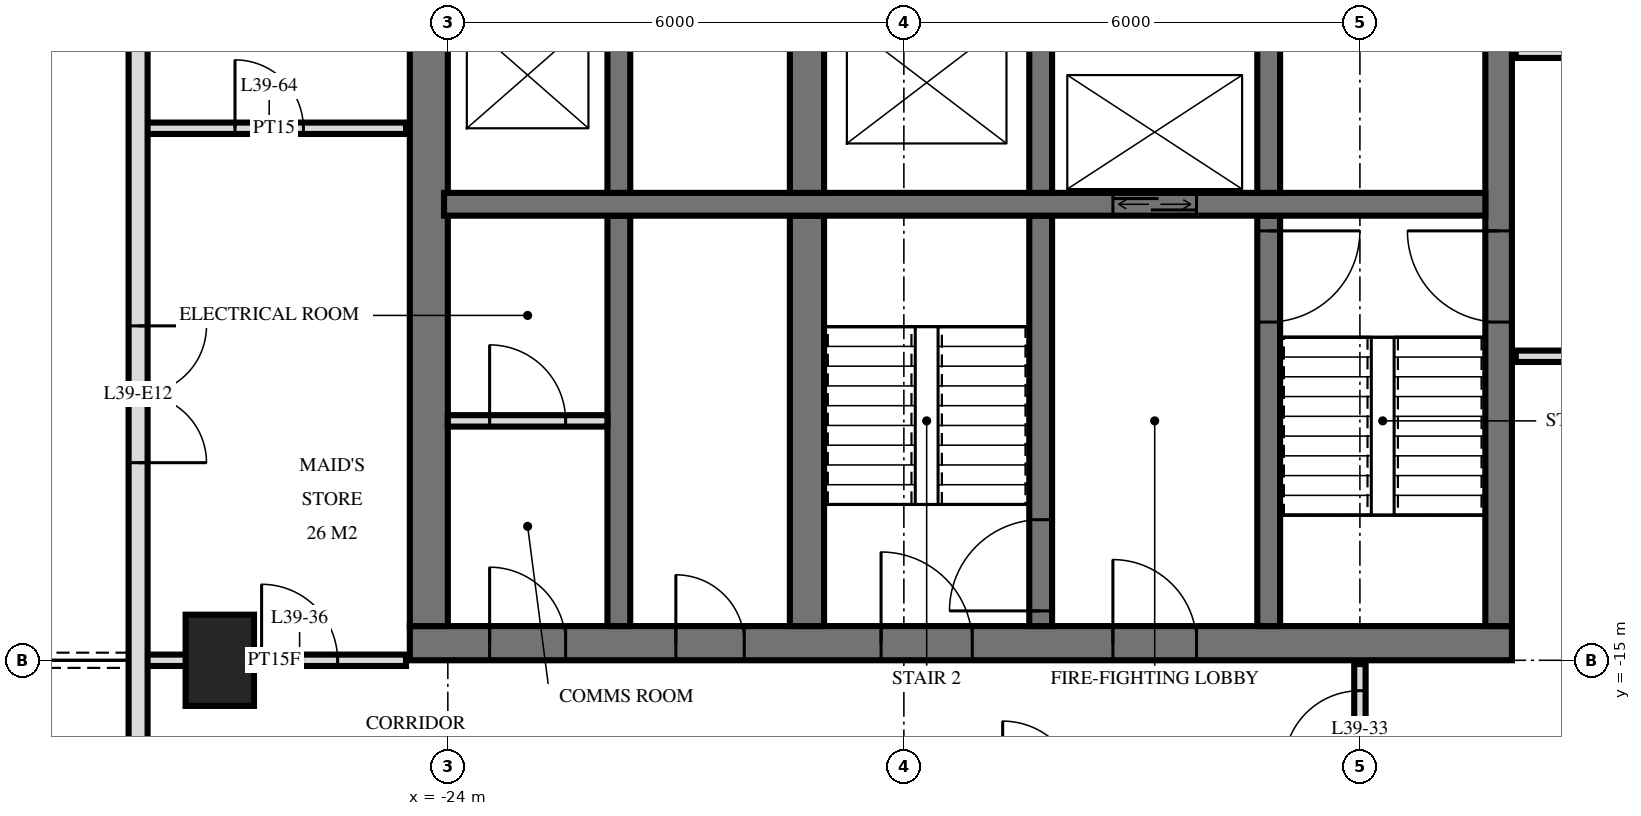
"""IFC4 building model, lengths in metres.
Left out: names, types, materials, properties, quantities, classifications, styles, units other than length and angle.
Written with IfcOpenShell. Run it as: python <this file> out.ifc"""

import sys

from ifc_helpers import new_model, si_unit, direction, frame, frame_2d, origin, origin_2d, place, context, subcontext, project, spatial, rectangle, extrude, element, fill, save


model = new_model("IFC4")
c1 = context("Model", 3, precision=1e-05, world=origin(), true_north=direction((0.0, 1.0)))
c2 = subcontext(c1, "Body", "Model", "MODEL_VIEW")
j1 = project(units=[si_unit("LENGTHUNIT", "METRE"), si_unit("PLANEANGLEUNIT", "RADIAN")], contexts=[c1])
p1 = place(None, origin())
s1 = spatial("IfcSite", under=j1, at=p1, CompositionType="ELEMENT")
p2 = place(p1, origin())
s2 = spatial("IfcBuilding", under=s1, at=p2, CompositionType="ELEMENT")
p3 = place(p2, frame((0.0, 0.0, 152.4)))
s3 = spatial("IfcBuildingStorey", under=s2, at=p3, CompositionType="ELEMENT", Elevation=152.4)
p4 = place(p3, frame((-27.0, -15.0, 0.0), z_axis=(0.0, 0.0, 1.0), x_axis=(0.0, 1.0, 0.0)))
e1 = element("IfcColumn", 1, at=p4, inside=s3, PredefinedType="COLUMN", context=c2, shape_type="SweptSolid", body=[
    extrude(rectangle(XDim=1.2, YDim=0.9, at=origin_2d()), origin(), (0.0, 0.0, 1.0), 3.6),
])
p5 = place(p3, frame((-24.5, -14.775, 0.0), z_axis=(0.0, 0.0, 1.0), x_axis=(1.0, 0.0, 0.0)))
e2 = element("IfcWall", 2, at=p5, inside=s3, PredefinedType="SHEAR", context=c2, shape_type="SweptSolid", body=[
    extrude(rectangle(XDim=14.5, YDim=0.45, at=frame_2d((7.25, 0.0))), origin(), (0.0, 0.0, 1.0), 3.6),
])
p6 = place(p5, frame((6.2, 0.0, 0.0)))
e3 = element("IfcOpeningElement", 3, at=p6, cuts=e2, PredefinedType="OPENING", context=c2, shape_type="SweptSolid", body=[
    extrude(rectangle(XDim=1.2, YDim=2.1, at=frame_2d((0.6, 1.05))), frame((0.0, 0.235, 0.0), z_axis=(0.0, -1.0, 0.0), x_axis=(1.0, 0.0, 0.0)), (0.0, 0.0, 1.0), 0.47),
])
p7 = place(p5, frame((9.25, 0.0, 0.0)))
e4 = element("IfcOpeningElement", 4, at=p7, cuts=e2, PredefinedType="OPENING", context=c2, shape_type="SweptSolid", body=[
    extrude(rectangle(XDim=1.1, YDim=2.1, at=frame_2d((0.55, 1.05))), frame((0.0, 0.235, 0.0), z_axis=(0.0, -1.0, 0.0), x_axis=(1.0, 0.0, 0.0)), (0.0, 0.0, 1.0), 0.47),
])
p8 = place(p5, frame((3.5, 0.0, 0.0)))
e5 = element("IfcOpeningElement", 5, at=p8, cuts=e2, PredefinedType="OPENING", context=c2, shape_type="SweptSolid", body=[
    extrude(rectangle(XDim=0.9, YDim=2.1, at=frame_2d((0.45, 1.05))), frame((0.0, 0.235, 0.0), z_axis=(0.0, -1.0, 0.0), x_axis=(1.0, 0.0, 0.0)), (0.0, 0.0, 1.0), 0.47),
])
p9 = place(p5, frame((1.05, 0.0, 0.0)))
e6 = element("IfcOpeningElement", 6, at=p9, cuts=e2, PredefinedType="OPENING", context=c2, shape_type="SweptSolid", body=[
    extrude(rectangle(XDim=1.0, YDim=2.1, at=frame_2d((0.5, 1.05))), frame((0.0, 0.235, 0.0), z_axis=(0.0, -1.0, 0.0), x_axis=(1.0, 0.0, 0.0)), (0.0, 0.0, 1.0), 0.47),
])
p10 = place(p3, frame((-10.175, -14.55, 0.0), z_axis=(0.0, 0.0, 1.0), x_axis=(0.0, 1.0, 0.0)))
e7 = element("IfcWall", 7, at=p10, inside=s3, PredefinedType="SHEAR", context=c2, shape_type="SweptSolid", body=[
    extrude(rectangle(XDim=14.1, YDim=0.35, at=frame_2d((7.05, 0.0))), origin(), (0.0, 0.0, 1.0), 3.6),
])
p11 = place(p10, frame((8.4, 0.0, 0.0)))
e8 = element("IfcOpeningElement", 8, at=p11, cuts=e7, PredefinedType="OPENING", context=c2, shape_type="SweptSolid", body=[
    extrude(rectangle(XDim=1.4, YDim=2.4, at=frame_2d((0.7, 1.2))), frame((0.0, 0.185, 0.0), z_axis=(0.0, -1.0, 0.0), x_axis=(1.0, 0.0, 0.0)), (0.0, 0.0, 1.0), 0.37),
])
p12 = place(p10, frame((10.0, 0.0, 0.0)))
e9 = element("IfcOpeningElement", 9, at=p12, cuts=e7, PredefinedType="OPENING", context=c2, shape_type="SweptSolid", body=[
    extrude(rectangle(XDim=1.4, YDim=2.4, at=frame_2d((0.7, 1.2))), frame((0.0, 0.185, 0.0), z_axis=(0.0, -1.0, 0.0), x_axis=(1.0, 0.0, 0.0)), (0.0, 0.0, 1.0), 0.37),
])
p13 = place(p10, frame((4.0, 0.0, 0.0)))
e10 = element("IfcOpeningElement", 10, at=p13, cuts=e7, PredefinedType="OPENING", context=c2, shape_type="SweptSolid", body=[
    extrude(rectangle(XDim=1.2, YDim=2.1, at=frame_2d((0.6, 1.05))), frame((0.0, 0.185, 0.0), z_axis=(0.0, -1.0, 0.0), x_axis=(1.0, 0.0, 0.0)), (0.0, 0.0, 1.0), 0.37),
])
p14 = place(p3, frame((-24.25, -14.55, 0.0), z_axis=(0.0, 0.0, 1.0), x_axis=(0.0, 1.0, 0.0)))
e11 = element("IfcWall", 11, at=p14, inside=s3, PredefinedType="SHEAR", context=c2, shape_type="SweptSolid", body=[
    extrude(rectangle(XDim=14.1, YDim=0.5, at=frame_2d((7.05, 0.0))), origin(), (0.0, 0.0, 1.0), 3.6),
])
p15 = place(p3, frame((-24.05, -9.0, 0.0), z_axis=(0.0, 0.0, 1.0), x_axis=(1.0, 0.0, 0.0)))
e12 = element("IfcWall", 12, at=p15, inside=s3, PredefinedType="SHEAR", context=c2, shape_type="SweptSolid", body=[
    extrude(rectangle(XDim=13.7, YDim=0.3, at=frame_2d((6.85, 0.0))), origin(), (0.0, 0.0, 1.0), 3.6),
])
p16 = place(p15, frame((8.8, 0.0, 0.0)))
e13 = element("IfcOpeningElement", 13, at=p16, cuts=e12, PredefinedType="OPENING", context=c2, shape_type="SweptSolid", body=[
    extrude(rectangle(XDim=1.1, YDim=2.1, at=frame_2d((0.55, 1.05))), frame((0.0, 0.16, 0.0), z_axis=(0.0, -1.0, 0.0), x_axis=(1.0, 0.0, 0.0)), (0.0, 0.0, 1.0), 0.32),
])
p17 = place(p3, frame((-13.2, -8.85, 0.0), z_axis=(0.0, 0.0, 1.0), x_axis=(0.0, 1.0, 0.0)))
e14 = element("IfcWall", 14, at=p17, inside=s3, PredefinedType="SHEAR", context=c2, shape_type="SweptSolid", body=[
    extrude(rectangle(XDim=2.3, YDim=0.3, at=frame_2d((1.15, 0.0))), origin(), (0.0, 0.0, 1.0), 3.6),
])
p18 = place(p3, frame((-13.2, -14.55, 0.0), z_axis=(0.0, 0.0, 1.0), x_axis=(0.0, 1.0, 0.0)))
e15 = element("IfcWall", 15, at=p18, inside=s3, PredefinedType="SHEAR", context=c2, shape_type="SweptSolid", body=[
    extrude(rectangle(XDim=5.4, YDim=0.3, at=frame_2d((2.7, 0.0))), origin(), (0.0, 0.0, 1.0), 3.6),
])
p19 = place(p18, frame((4.0, 0.0, 0.0)))
e16 = element("IfcOpeningElement", 16, at=p19, cuts=e15, PredefinedType="OPENING", context=c2, shape_type="SweptSolid", body=[
    extrude(rectangle(XDim=1.2, YDim=2.1, at=frame_2d((0.6, 1.05))), frame((0.0, 0.16, 0.0), z_axis=(0.0, -1.0, 0.0), x_axis=(1.0, 0.0, 0.0)), (0.0, 0.0, 1.0), 0.32),
])
p20 = place(p3, frame((-16.2, -8.85, 0.0), z_axis=(0.0, 0.0, 1.0), x_axis=(0.0, 1.0, 0.0)))
e17 = element("IfcWall", 17, at=p20, inside=s3, PredefinedType="SHEAR", context=c2, shape_type="SweptSolid", body=[
    extrude(rectangle(XDim=2.3, YDim=0.3, at=frame_2d((1.15, 0.0))), origin(), (0.0, 0.0, 1.0), 3.6),
])
p21 = place(p3, frame((-16.2, -14.55, 0.0), z_axis=(0.0, 0.0, 1.0), x_axis=(0.0, 1.0, 0.0)))
e18 = element("IfcWall", 18, at=p21, inside=s3, PredefinedType="SHEAR", context=c2, shape_type="SweptSolid", body=[
    extrude(rectangle(XDim=5.4, YDim=0.3, at=frame_2d((2.7, 0.0))), origin(), (0.0, 0.0, 1.0), 3.6),
])
p22 = place(p21, frame((0.2, 0.0, 0.0)))
e19 = element("IfcOpeningElement", 19, at=p22, cuts=e18, PredefinedType="OPENING", context=c2, shape_type="SweptSolid", body=[
    extrude(rectangle(XDim=1.2, YDim=2.1, at=frame_2d((0.6, 1.05))), frame((0.0, 0.16, 0.0), z_axis=(0.0, -1.0, 0.0), x_axis=(1.0, 0.0, 0.0)), (0.0, 0.0, 1.0), 0.32),
])
p23 = place(p3, frame((-19.275, -8.85, 0.0), z_axis=(0.0, 0.0, 1.0), x_axis=(0.0, 1.0, 0.0)))
e20 = element("IfcWall", 20, at=p23, inside=s3, PredefinedType="SHEAR", context=c2, shape_type="SweptSolid", body=[
    extrude(rectangle(XDim=2.3, YDim=0.45, at=frame_2d((1.15, 0.0))), origin(), (0.0, 0.0, 1.0), 3.6),
])
p24 = place(p3, frame((-19.275, -14.55, 0.0), z_axis=(0.0, 0.0, 1.0), x_axis=(0.0, 1.0, 0.0)))
e21 = element("IfcWall", 21, at=p24, inside=s3, PredefinedType="SHEAR", context=c2, shape_type="SweptSolid", body=[
    extrude(rectangle(XDim=5.4, YDim=0.45, at=frame_2d((2.7, 0.0))), origin(), (0.0, 0.0, 1.0), 3.6),
])
p25 = place(p3, frame((-21.75, -8.85, 0.0), z_axis=(0.0, 0.0, 1.0), x_axis=(0.0, 1.0, 0.0)))
e22 = element("IfcWall", 22, at=p25, inside=s3, PredefinedType="SHEAR", context=c2, shape_type="SweptSolid", body=[
    extrude(rectangle(XDim=2.3, YDim=0.3, at=frame_2d((1.15, 0.0))), origin(), (0.0, 0.0, 1.0), 3.6),
])
p26 = place(p3, frame((-21.75, -14.55, 0.0), z_axis=(0.0, 0.0, 1.0), x_axis=(0.0, 1.0, 0.0)))
e23 = element("IfcWall", 23, at=p26, inside=s3, PredefinedType="SHEAR", context=c2, shape_type="SweptSolid", body=[
    extrude(rectangle(XDim=5.4, YDim=0.3, at=frame_2d((2.7, 0.0))), origin(), (0.0, 0.0, 1.0), 3.6),
])
p27 = place(p3, frame((-28.075, -3.325, 0.0), z_axis=(0.0, 0.0, 1.0), x_axis=(0.0, -1.0, 0.0)))
e24 = element("IfcWall", 24, at=p27, inside=s3, PredefinedType="SOLIDWALL", context=c2, shape_type="SweptSolid", body=[
    extrude(rectangle(XDim=25.951, YDim=0.25, at=frame_2d((12.975, 0.0))), origin(), (0.0, 0.0, 1.0), 3.32),
])
p28 = place(p27, frame((7.275, 0.0, 0.0)))
e25 = element("IfcOpeningElement", 25, at=p28, cuts=e24, PredefinedType="OPENING", context=c2, shape_type="SweptSolid", body=[
    extrude(rectangle(XDim=1.8, YDim=2.4, at=frame_2d((0.9, 1.2))), frame((0.0, 0.135, 0.0), z_axis=(0.0, -1.0, 0.0), x_axis=(1.0, 0.0, 0.0)), (0.0, 0.0, 1.0), 0.27),
])
p29 = place(p27, frame((18.175, 0.0, 0.0)))
e26 = element("IfcOpeningElement", 26, at=p29, cuts=e24, PredefinedType="OPENING", context=c2, shape_type="SweptSolid", body=[
    extrude(rectangle(XDim=1.8, YDim=2.4, at=frame_2d((0.9, 1.2))), frame((0.0, 0.135, 0.0), z_axis=(0.0, -1.0, 0.0), x_axis=(1.0, 0.0, 0.0)), (0.0, 0.0, 1.0), 0.27),
])
p30 = place(p27, frame((21.075, 0.0, 0.0)))
e27 = element("IfcOpeningElement", 27, at=p30, cuts=e24, PredefinedType="OPENING", context=c2, shape_type="SweptSolid", body=[
    extrude(rectangle(XDim=1.8, YDim=2.4, at=frame_2d((0.9, 1.2))), frame((0.0, 0.135, 0.0), z_axis=(0.0, -1.0, 0.0), x_axis=(1.0, 0.0, 0.0)), (0.0, 0.0, 1.0), 0.27),
])
p31 = place(p27, frame((23.825, 0.0, 0.3)))
e28 = element("IfcOpeningElement", 28, at=p31, cuts=e24, PredefinedType="OPENING", context=c2, shape_type="SweptSolid", body=[
    extrude(rectangle(XDim=1.8, YDim=2.1, at=frame_2d((0.9, 1.05))), frame((0.0, 0.135, 0.0), z_axis=(0.0, -1.0, 0.0), x_axis=(1.0, 0.0, 0.0)), (0.0, 0.0, 1.0), 0.27),
])
p32 = place(p3, frame((-24.0, -11.85, 0.0), z_axis=(0.0, 0.0, 1.0), x_axis=(1.0, 0.0, 0.0)))
e29 = element("IfcWall", 29, at=p32, inside=s3, PredefinedType="PARTITIONING", context=c2, shape_type="SweptSolid", body=[
    extrude(rectangle(XDim=2.1, YDim=0.15, at=frame_2d((1.05, 0.0))), origin(), (0.0, 0.0, 1.0), 3.3),
])
p33 = place(p32, frame((0.55, 0.0, 0.0)))
e30 = element("IfcOpeningElement", 30, at=p33, cuts=e29, PredefinedType="OPENING", context=c2, shape_type="SweptSolid", body=[
    extrude(rectangle(XDim=1.0, YDim=2.1, at=frame_2d((0.5, 1.05))), frame((0.0, 0.085, 0.0), z_axis=(0.0, -1.0, 0.0), x_axis=(1.0, 0.0, 0.0)), (0.0, 0.0, 1.0), 0.17),
])
p34 = place(p3, frame((-12.0, -16.8, 0.0), z_axis=(0.0, 0.0, 1.0), x_axis=(0.0, 1.0, 0.0)))
e31 = element("IfcWall", 31, at=p34, inside=s3, PredefinedType="PARTITIONING", context=c2, shape_type="SweptSolid", body=[
    extrude(rectangle(XDim=1.75, YDim=0.15, at=frame_2d((0.875, 0.0))), origin(), (0.0, 0.0, 1.0), 3.32),
])
p35 = place(p34, frame((0.4, 0.0, 0.0)))
e32 = element("IfcOpeningElement", 32, at=p35, cuts=e31, PredefinedType="OPENING", context=c2, shape_type="SweptSolid", body=[
    extrude(rectangle(XDim=1.0, YDim=2.1, at=frame_2d((0.5, 1.05))), frame((0.0, 0.085, 0.0), z_axis=(0.0, -1.0, 0.0), x_axis=(1.0, 0.0, 0.0)), (0.0, 0.0, 1.0), 0.17),
])
p36 = place(p3, frame((-28.02, -15.0, 0.0), z_axis=(0.0, 0.0, 1.0), x_axis=(1.0, 0.0, 0.0)))
e33 = element("IfcWall", 33, at=p36, inside=s3, PredefinedType="PARTITIONING", context=c2, shape_type="SweptSolid", body=[
    extrude(rectangle(XDim=3.47, YDim=0.15, at=frame_2d((1.735, 0.0))), origin(), (0.0, 0.0, 1.0), 3.32),
])
p37 = place(p36, frame((1.57, 0.0, 0.0)))
e34 = element("IfcOpeningElement", 34, at=p37, cuts=e33, PredefinedType="OPENING", context=c2, shape_type="SweptSolid", body=[
    extrude(rectangle(XDim=1.0, YDim=2.1, at=frame_2d((0.5, 1.05))), frame((0.0, 0.085, 0.0), z_axis=(0.0, -1.0, 0.0), x_axis=(1.0, 0.0, 0.0)), (0.0, 0.0, 1.0), 0.17),
])
p38 = place(p3, frame((-9.95, -11.0, 0.0), z_axis=(0.0, 0.0, 1.0), x_axis=(1.0, 0.0, 0.0)))
e35 = element("IfcWall", 35, at=p38, inside=s3, PredefinedType="PARTITIONING", context=c2, shape_type="SweptSolid", body=[
    extrude(rectangle(XDim=19.9, YDim=0.15, at=frame_2d((9.95, 0.0))), origin(), (0.0, 0.0, 1.0), 3.32),
])
p39 = place(p38, frame((9.45, 0.0, 0.0)))
e36 = element("IfcOpeningElement", 36, at=p39, cuts=e35, PredefinedType="OPENING", context=c2, shape_type="SweptSolid", body=[
    extrude(rectangle(XDim=1.0, YDim=2.1, at=frame_2d((0.5, 1.05))), frame((0.0, 0.085, 0.0), z_axis=(0.0, -1.0, 0.0), x_axis=(1.0, 0.0, 0.0)), (0.0, 0.0, 1.0), 0.17),
])
p40 = place(p38, frame((3.45, 0.0, 0.0)))
e37 = element("IfcOpeningElement", 37, at=p40, cuts=e35, PredefinedType="OPENING", context=c2, shape_type="SweptSolid", body=[
    extrude(rectangle(XDim=1.0, YDim=2.1, at=frame_2d((0.5, 1.05))), frame((0.0, 0.085, 0.0), z_axis=(0.0, -1.0, 0.0), x_axis=(1.0, 0.0, 0.0)), (0.0, 0.0, 1.0), 0.17),
])
p41 = place(p3, frame((-28.02, -8.0, 0.0), z_axis=(0.0, 0.0, 1.0), x_axis=(1.0, 0.0, 0.0)))
e38 = element("IfcWall", 38, at=p41, inside=s3, PredefinedType="PARTITIONING", context=c2, shape_type="SweptSolid", body=[
    extrude(rectangle(XDim=3.47, YDim=0.15, at=frame_2d((1.735, 0.0))), origin(), (0.0, 0.0, 1.0), 3.32),
])
p42 = place(p41, frame((1.22, 0.0, 0.0)))
e39 = element("IfcOpeningElement", 39, at=p42, cuts=e38, PredefinedType="OPENING", context=c2, shape_type="SweptSolid", body=[
    extrude(rectangle(XDim=0.9, YDim=2.1, at=frame_2d((0.45, 1.05))), frame((0.0, 0.085, 0.0), z_axis=(0.0, -1.0, 0.0), x_axis=(1.0, 0.0, 0.0)), (0.0, 0.0, 1.0), 0.17),
])
p43 = place(p3, frame((-9.95, -7.0, 0.0), z_axis=(0.0, 0.0, 1.0), x_axis=(1.0, 0.0, 0.0)))
e40 = element("IfcWall", 40, at=p43, inside=s3, PredefinedType="PARTITIONING", context=c2, shape_type="SweptSolid", body=[
    extrude(rectangle(XDim=19.9, YDim=0.15, at=frame_2d((9.95, 0.0))), origin(), (0.0, 0.0, 1.0), 3.32),
])
p44 = place(p43, frame((9.45, 0.0, 0.0)))
e41 = element("IfcOpeningElement", 41, at=p44, cuts=e40, PredefinedType="OPENING", context=c2, shape_type="SweptSolid", body=[
    extrude(rectangle(XDim=1.0, YDim=2.1, at=frame_2d((0.5, 1.05))), frame((0.0, 0.085, 0.0), z_axis=(0.0, -1.0, 0.0), x_axis=(1.0, 0.0, 0.0)), (0.0, 0.0, 1.0), 0.17),
])
p45 = place(p43, frame((15.45, 0.0, 0.0)))
e42 = element("IfcOpeningElement", 42, at=p45, cuts=e40, PredefinedType="OPENING", context=c2, shape_type="SweptSolid", body=[
    extrude(rectangle(XDim=1.0, YDim=2.1, at=frame_2d((0.5, 1.05))), frame((0.0, 0.085, 0.0), z_axis=(0.0, -1.0, 0.0), x_axis=(1.0, 0.0, 0.0)), (0.0, 0.0, 1.0), 0.17),
])
p46 = place(p28, origin())
e43 = element("IfcDoor", 43, at=p46, inside=s3, OperationType="DOUBLE_DOOR_SINGLE_SWING", PredefinedType="DOOR", context=c2, shape_type="SweptSolid", body=[
    extrude(rectangle(XDim=1.8, YDim=2.4, at=frame_2d((0.9, 1.2))), frame((0.0, 0.025, 0.0), z_axis=(0.0, -1.0, 0.0), x_axis=(1.0, 0.0, 0.0)), (0.0, 0.0, 1.0), 0.05),
])
fill(e25, e43)
p47 = place(p16, origin())
e44 = element("IfcDoor", 44, at=p47, inside=s3, OperationType="DOUBLE_DOOR_SLIDING", PredefinedType="USERDEFINED", context=c2, shape_type="SweptSolid", body=[
    extrude(rectangle(XDim=1.1, YDim=2.1, at=frame_2d((0.55, 1.05))), frame((0.0, 0.025, 0.0), z_axis=(0.0, -1.0, 0.0), x_axis=(1.0, 0.0, 0.0)), (0.0, 0.0, 1.0), 0.05),
])
fill(e13, e44)
p48 = place(p13, origin())
e45 = element("IfcDoor", 45, at=p48, inside=s3, OperationType="SINGLE_SWING_LEFT", PredefinedType="DOOR", context=c2, shape_type="SweptSolid", body=[
    extrude(rectangle(XDim=1.2, YDim=2.1, at=frame_2d((0.6, 1.05))), frame((0.0, 0.025, 0.0), z_axis=(0.0, -1.0, 0.0), x_axis=(1.0, 0.0, 0.0)), (0.0, 0.0, 1.0), 0.05),
])
fill(e10, e45)
p49 = place(p6, origin())
e46 = element("IfcDoor", 46, at=p49, inside=s3, OperationType="SINGLE_SWING_RIGHT", PredefinedType="DOOR", context=c2, shape_type="SweptSolid", body=[
    extrude(rectangle(XDim=1.2, YDim=2.1, at=frame_2d((0.6, 1.05))), frame((0.0, 0.025, 0.0), z_axis=(0.0, -1.0, 0.0), x_axis=(1.0, 0.0, 0.0)), (0.0, 0.0, 1.0), 0.05),
])
fill(e3, e46)
p50 = place(p7, origin())
e47 = element("IfcDoor", 47, at=p50, inside=s3, OperationType="SINGLE_SWING_RIGHT", PredefinedType="DOOR", context=c2, shape_type="SweptSolid", body=[
    extrude(rectangle(XDim=1.1, YDim=2.1, at=frame_2d((0.55, 1.05))), frame((0.0, 0.025, 0.0), z_axis=(0.0, -1.0, 0.0), x_axis=(1.0, 0.0, 0.0)), (0.0, 0.0, 1.0), 0.05),
])
fill(e4, e47)
p51 = place(p8, origin())
e48 = element("IfcDoor", 48, at=p51, inside=s3, OperationType="SINGLE_SWING_RIGHT", PredefinedType="DOOR", context=c2, shape_type="SweptSolid", body=[
    extrude(rectangle(XDim=0.9, YDim=2.1, at=frame_2d((0.45, 1.05))), frame((0.0, 0.025, 0.0), z_axis=(0.0, -1.0, 0.0), x_axis=(1.0, 0.0, 0.0)), (0.0, 0.0, 1.0), 0.05),
])
fill(e5, e48)
p52 = place(p9, origin())
e49 = element("IfcDoor", 49, at=p52, inside=s3, OperationType="SINGLE_SWING_RIGHT", PredefinedType="DOOR", context=c2, shape_type="SweptSolid", body=[
    extrude(rectangle(XDim=1.0, YDim=2.1, at=frame_2d((0.5, 1.05))), frame((0.0, 0.025, 0.0), z_axis=(0.0, -1.0, 0.0), x_axis=(1.0, 0.0, 0.0)), (0.0, 0.0, 1.0), 0.05),
])
fill(e6, e49)
p53 = place(p19, frame((0.6, 0.0, 0.0), z_axis=(0.0, 0.0, 1.0), x_axis=(-1.0, 0.0, 0.0)))
e50 = element("IfcDoor", 50, at=p53, inside=s3, OperationType="SINGLE_SWING_RIGHT", PredefinedType="DOOR", context=c2, shape_type="SweptSolid", body=[
    extrude(rectangle(XDim=1.2, YDim=2.1, at=frame_2d((0.0, 1.05))), frame((0.0, -0.025, 0.0), z_axis=(0.0, 1.0, 0.0), x_axis=(-1.0, 0.0, 0.0)), (0.0, 0.0, 1.0), 0.05),
])
fill(e16, e50)
p54 = place(p22, origin())
e51 = element("IfcDoor", 51, at=p54, inside=s3, OperationType="SINGLE_SWING_RIGHT", PredefinedType="DOOR", context=c2, shape_type="SweptSolid", body=[
    extrude(rectangle(XDim=1.2, YDim=2.1, at=frame_2d((0.6, 1.05))), frame((0.0, 0.025, 0.0), z_axis=(0.0, -1.0, 0.0), x_axis=(1.0, 0.0, 0.0)), (0.0, 0.0, 1.0), 0.05),
])
fill(e19, e51)
p55 = place(p33, origin())
e52 = element("IfcDoor", 52, at=p55, inside=s3, OperationType="SINGLE_SWING_RIGHT", PredefinedType="DOOR", context=c2, shape_type="SweptSolid", body=[
    extrude(rectangle(XDim=1.0, YDim=2.1, at=frame_2d((0.5, 1.05))), frame((0.0, 0.025, 0.0), z_axis=(0.0, -1.0, 0.0), x_axis=(1.0, 0.0, 0.0)), (0.0, 0.0, 1.0), 0.05),
])
fill(e30, e52)
p56 = place(p35, origin())
e53 = element("IfcDoor", 53, at=p56, inside=s3, OperationType="SINGLE_SWING_RIGHT", PredefinedType="DOOR", context=c2, shape_type="SweptSolid", body=[
    extrude(rectangle(XDim=1.0, YDim=2.1, at=frame_2d((0.5, 1.05))), frame((0.0, 0.025, 0.0), z_axis=(0.0, -1.0, 0.0), x_axis=(1.0, 0.0, 0.0)), (0.0, 0.0, 1.0), 0.05),
])
fill(e32, e53)
p57 = place(p37, origin())
e54 = element("IfcDoor", 54, at=p57, inside=s3, OperationType="SINGLE_SWING_RIGHT", PredefinedType="DOOR", context=c2, shape_type="SweptSolid", body=[
    extrude(rectangle(XDim=1.0, YDim=2.1, at=frame_2d((0.5, 1.05))), frame((0.0, 0.025, 0.0), z_axis=(0.0, -1.0, 0.0), x_axis=(1.0, 0.0, 0.0)), (0.0, 0.0, 1.0), 0.05),
])
fill(e34, e54)
p58 = place(p42, origin())
e55 = element("IfcDoor", 55, at=p58, inside=s3, OperationType="SINGLE_SWING_RIGHT", PredefinedType="DOOR", context=c2, shape_type="SweptSolid", body=[
    extrude(rectangle(XDim=0.9, YDim=2.1, at=frame_2d((0.45, 1.05))), frame((0.0, 0.025, 0.0), z_axis=(0.0, -1.0, 0.0), x_axis=(1.0, 0.0, 0.0)), (0.0, 0.0, 1.0), 0.05),
])
fill(e39, e55)
save(model, sys.argv[1])
